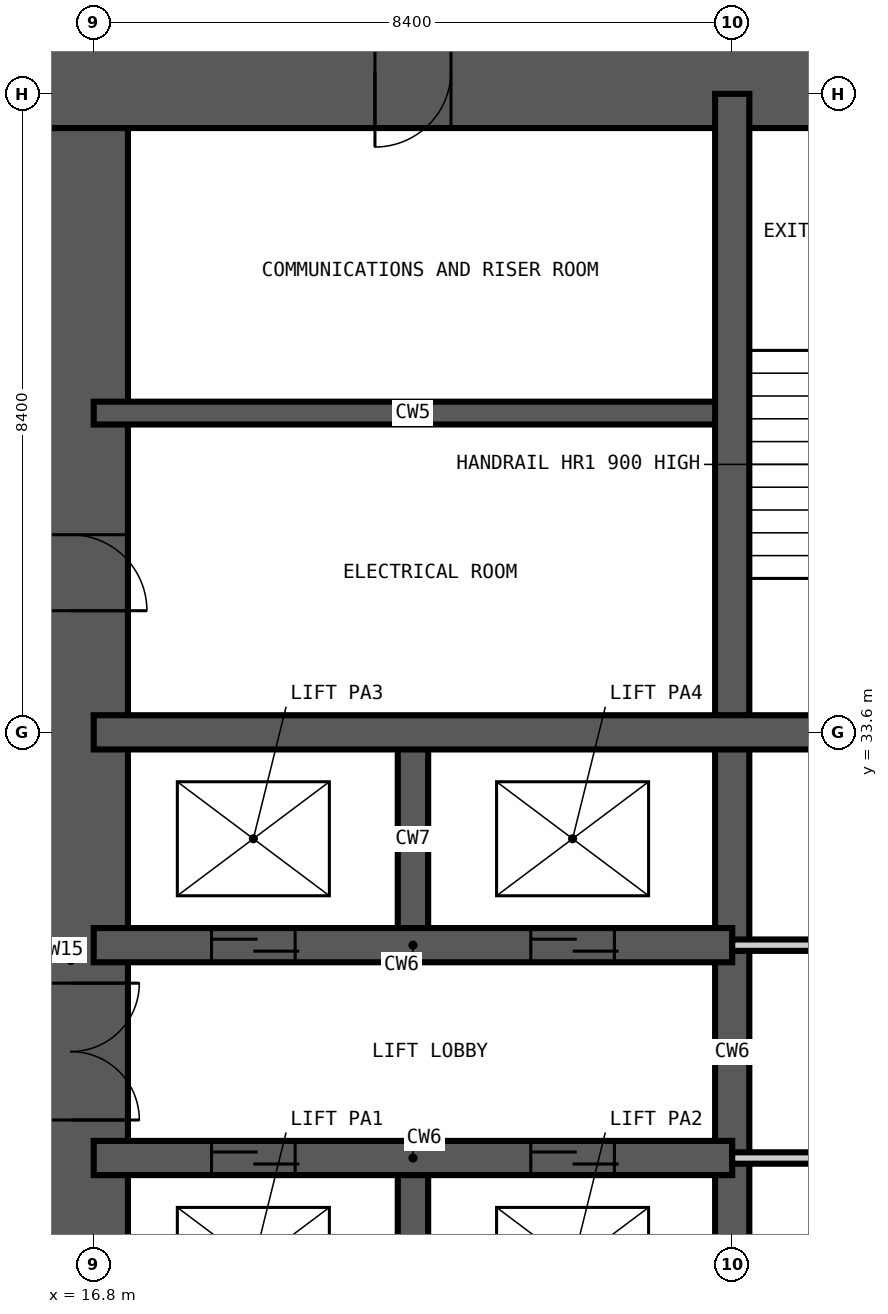
"""IFC4 building model, lengths in metres.
Left out: names, types, materials, properties, quantities, classifications, styles, units other than length and angle.
Written with IfcOpenShell. Run it as: python <this file> out.ifc"""

import sys

from ifc_helpers import new_model, si_unit, direction, frame, frame_2d, origin, place, context, subcontext, project, spatial, rectangle, extrude, element, fill, save


model = new_model("IFC4")
c1 = context("Model", 3, precision=1e-05, world=origin(), true_north=direction((0.0, 1.0)))
c2 = subcontext(c1, "Body", "Model", "MODEL_VIEW")
j1 = project(units=[si_unit("LENGTHUNIT", "METRE"), si_unit("PLANEANGLEUNIT", "RADIAN")], contexts=[c1])
p1 = place(None, origin())
s1 = spatial("IfcSite", under=j1, at=p1, CompositionType="ELEMENT")
p2 = place(p1, origin())
s2 = spatial("IfcBuilding", under=s1, at=p2, CompositionType="ELEMENT")
p3 = place(p2, frame((0.0, 0.0, 55.8)))
s3 = spatial("IfcBuildingStorey", under=s2, at=p3, CompositionType="ELEMENT", Elevation=55.8)
p4 = place(p3, frame((43.05, 42.3, -0.35), z_axis=(0.0, 0.0, 1.0), x_axis=(-1.0, 0.0, 0.0)))
e1 = element("IfcWall", 1, at=p4, inside=s3, PredefinedType="SHEAR", context=c2, shape_type="SweptSolid", body=[
    extrude(rectangle(XDim=27.3, YDim=1.5, at=frame_2d((13.65, 0.0))), origin(), (0.0, 0.0, 1.0), 3.6),
])
p5 = place(p4, frame((21.55, 0.0, 0.35)))
e2 = element("IfcOpeningElement", 2, at=p5, cuts=e1, PredefinedType="OPENING", context=c2, shape_type="SweptSolid", body=[
    extrude(rectangle(XDim=1.0, YDim=2.1, at=frame_2d((0.5, 1.05))), frame((0.0, 0.76, 0.0), z_axis=(0.0, -1.0, 0.0), x_axis=(1.0, 0.0, 0.0)), (0.0, 0.0, 1.0), 1.52),
])
p6 = place(p4, frame((10.95, 0.0, 0.35)))
e3 = element("IfcOpeningElement", 3, at=p6, cuts=e1, PredefinedType="OPENING", context=c2, shape_type="SweptSolid", body=[
    extrude(rectangle(XDim=1.2, YDim=2.2, at=frame_2d((0.6, 1.1))), frame((0.0, 0.76, 0.0), z_axis=(0.0, -1.0, 0.0), x_axis=(1.0, 0.0, 0.0)), (0.0, 0.0, 1.0), 1.52),
])
p7 = place(p3, frame((16.5, 41.55, -0.35), z_axis=(0.0, 0.0, 1.0), x_axis=(0.0, -1.0, 0.0)))
e4 = element("IfcWall", 4, at=p7, inside=s3, PredefinedType="SHEAR", context=c2, shape_type="SweptSolid", body=[
    extrude(rectangle(XDim=24.3, YDim=1.5, at=frame_2d((12.15, 0.0))), origin(), (0.0, 0.0, 1.0), 3.6),
])
p8 = place(p7, frame((11.25, 0.0, 0.35)))
e5 = element("IfcOpeningElement", 5, at=p8, cuts=e4, PredefinedType="OPENING", context=c2, shape_type="SweptSolid", body=[
    extrude(rectangle(XDim=1.8, YDim=2.2, at=frame_2d((0.9, 1.1))), frame((0.0, 0.76, 0.0), z_axis=(0.0, -1.0, 0.0), x_axis=(1.0, 0.0, 0.0)), (0.0, 0.0, 1.0), 1.52),
])
p9 = place(p7, frame((20.05, 0.0, 0.35)))
e6 = element("IfcOpeningElement", 6, at=p9, cuts=e4, PredefinedType="OPENING", context=c2, shape_type="SweptSolid", body=[
    extrude(rectangle(XDim=1.0, YDim=2.1, at=frame_2d((0.5, 1.05))), frame((0.0, 0.76, 0.0), z_axis=(0.0, -1.0, 0.0), x_axis=(1.0, 0.0, 0.0)), (0.0, 0.0, 1.0), 1.52),
])
p10 = place(p7, frame((5.35, 0.0, 0.35)))
e7 = element("IfcOpeningElement", 7, at=p10, cuts=e4, PredefinedType="OPENING", context=c2, shape_type="SweptSolid", body=[
    extrude(rectangle(XDim=1.0, YDim=2.1, at=frame_2d((0.5, 1.05))), frame((0.0, 0.76, 0.0), z_axis=(0.0, -1.0, 0.0), x_axis=(1.0, 0.0, 0.0)), (0.0, 0.0, 1.0), 1.52),
])
p11 = place(p3, frame((16.8, 37.8, -0.35), z_axis=(0.0, 0.0, 1.0), x_axis=(1.0, 0.0, 0.0)))
e8 = element("IfcWall", 8, at=p11, inside=s3, PredefinedType="SHEAR", context=c2, shape_type="SweptSolid", body=[
    extrude(rectangle(XDim=8.4, YDim=0.3, at=frame_2d((4.2, 0.0))), origin(), (0.0, 0.0, 1.0), 3.6),
])
for number, where, z_axis, x_axis in (
    (9, (21.0, 25.2, -0.35), (0.0, 0.0, 1.0), (0.0, 1.0, 0.0)),
    (10, (21.0, 30.8, -0.35), (0.0, 0.0, 1.0), (0.0, 1.0, 0.0)),
):
    element("IfcWall", number, at=place(p3, frame(where, z_axis=z_axis, x_axis=x_axis)), inside=s3, PredefinedType="SHEAR", context=c2, shape_type="SweptSolid", body=[
        extrude(rectangle(XDim=2.8, YDim=0.4, at=frame_2d((1.4, 0.0))), origin(), (0.0, 0.0, 1.0), 3.6),
    ])
p12 = place(p3, frame((25.2, 16.8, -0.35), z_axis=(0.0, 0.0, 1.0), x_axis=(0.0, 1.0, 0.0)))
e11 = element("IfcWall", 11, at=p12, inside=s3, PredefinedType="SHEAR", context=c2, shape_type="SweptSolid", body=[
    extrude(rectangle(XDim=25.2, YDim=0.45, at=frame_2d((12.6, 0.0))), origin(), (0.0, 0.0, 1.0), 3.6),
])
p13 = place(p3, frame((16.8, 28.0, -0.35), z_axis=(0.0, 0.0, 1.0), x_axis=(1.0, 0.0, 0.0)))
e12 = element("IfcWall", 12, at=p13, inside=s3, PredefinedType="SHEAR", context=c2, shape_type="SweptSolid", body=[
    extrude(rectangle(XDim=8.4, YDim=0.45, at=frame_2d((4.2, 0.0))), origin(), (0.0, 0.0, 1.0), 3.6),
])
p14 = place(p13, frame((1.55, 0.0, 0.35)))
e13 = element("IfcOpeningElement", 13, at=p14, cuts=e12, PredefinedType="OPENING", context=c2, shape_type="SweptSolid", body=[
    extrude(rectangle(XDim=1.1, YDim=2.2, at=frame_2d((0.55, 1.1))), frame((0.0, 0.235, 0.0), z_axis=(0.0, -1.0, 0.0), x_axis=(1.0, 0.0, 0.0)), (0.0, 0.0, 1.0), 0.47),
])
p15 = place(p13, frame((5.75, 0.0, 0.35)))
e14 = element("IfcOpeningElement", 14, at=p15, cuts=e12, PredefinedType="OPENING", context=c2, shape_type="SweptSolid", body=[
    extrude(rectangle(XDim=1.1, YDim=2.2, at=frame_2d((0.55, 1.1))), frame((0.0, 0.235, 0.0), z_axis=(0.0, -1.0, 0.0), x_axis=(1.0, 0.0, 0.0)), (0.0, 0.0, 1.0), 0.47),
])
p16 = place(p3, frame((16.8, 30.8, -0.35), z_axis=(0.0, 0.0, 1.0), x_axis=(1.0, 0.0, 0.0)))
e15 = element("IfcWall", 15, at=p16, inside=s3, PredefinedType="SHEAR", context=c2, shape_type="SweptSolid", body=[
    extrude(rectangle(XDim=8.4, YDim=0.45, at=frame_2d((4.2, 0.0))), origin(), (0.0, 0.0, 1.0), 3.6),
])
p17 = place(p16, frame((1.55, 0.0, 0.35)))
e16 = element("IfcOpeningElement", 16, at=p17, cuts=e15, PredefinedType="OPENING", context=c2, shape_type="SweptSolid", body=[
    extrude(rectangle(XDim=1.1, YDim=2.2, at=frame_2d((0.55, 1.1))), frame((0.0, 0.235, 0.0), z_axis=(0.0, -1.0, 0.0), x_axis=(1.0, 0.0, 0.0)), (0.0, 0.0, 1.0), 0.47),
])
p18 = place(p16, frame((5.75, 0.0, 0.35)))
e17 = element("IfcOpeningElement", 17, at=p18, cuts=e15, PredefinedType="OPENING", context=c2, shape_type="SweptSolid", body=[
    extrude(rectangle(XDim=1.1, YDim=2.2, at=frame_2d((0.55, 1.1))), frame((0.0, 0.235, 0.0), z_axis=(0.0, -1.0, 0.0), x_axis=(1.0, 0.0, 0.0)), (0.0, 0.0, 1.0), 0.47),
])
p19 = place(p3, frame((16.8, 33.6, -0.35), z_axis=(0.0, 0.0, 1.0), x_axis=(1.0, 0.0, 0.0)))
e18 = element("IfcWall", 18, at=p19, inside=s3, PredefinedType="SHEAR", context=c2, shape_type="SweptSolid", body=[
    extrude(rectangle(XDim=25.2, YDim=0.45, at=frame_2d((12.6, 0.0))), origin(), (0.0, 0.0, 1.0), 3.6),
])
p20 = place(p3, frame((25.2, 28.0, 0.0), z_axis=(0.0, 0.0, 1.0), x_axis=(1.0, 0.0, 0.0)))
e19 = element("IfcWall", 19, at=p20, inside=s3, PredefinedType="PARTITIONING", context=c2, shape_type="SweptSolid", body=[
    extrude(rectangle(XDim=8.4, YDim=0.15, at=frame_2d((4.2, 0.0))), origin(), (0.0, 0.0, 1.0), 3.25),
])
p21 = place(p20, frame((3.7, 0.0, 0.0)))
e20 = element("IfcOpeningElement", 20, at=p21, cuts=e19, PredefinedType="OPENING", context=c2, shape_type="SweptSolid", body=[
    extrude(rectangle(XDim=1.0, YDim=2.1, at=frame_2d((0.5, 1.05))), frame((0.0, 0.085, 0.0), z_axis=(0.0, -1.0, 0.0), x_axis=(1.0, 0.0, 0.0)), (0.0, 0.0, 1.0), 0.17),
])
p22 = place(p3, frame((25.2, 30.8, 0.0), z_axis=(0.0, 0.0, 1.0), x_axis=(1.0, 0.0, 0.0)))
e21 = element("IfcWall", 21, at=p22, inside=s3, PredefinedType="PARTITIONING", context=c2, shape_type="SweptSolid", body=[
    extrude(rectangle(XDim=8.4, YDim=0.15, at=frame_2d((4.2, 0.0))), origin(), (0.0, 0.0, 1.0), 3.25),
])
p23 = place(p22, frame((3.7, 0.0, 0.0)))
e22 = element("IfcOpeningElement", 22, at=p23, cuts=e21, PredefinedType="OPENING", context=c2, shape_type="SweptSolid", body=[
    extrude(rectangle(XDim=1.0, YDim=2.1, at=frame_2d((0.5, 1.05))), frame((0.0, 0.085, 0.0), z_axis=(0.0, -1.0, 0.0), x_axis=(1.0, 0.0, 0.0)), (0.0, 0.0, 1.0), 0.17),
])
p24 = place(p14, origin())
e23 = element("IfcDoor", 23, at=p24, inside=s3, OperationType="DOUBLE_DOOR_SLIDING", PredefinedType="DOOR", context=c2, shape_type="SweptSolid", body=[
    extrude(rectangle(XDim=1.1, YDim=2.2, at=frame_2d((0.55, 1.1))), frame((0.0, 0.025, 0.0), z_axis=(0.0, -1.0, 0.0), x_axis=(1.0, 0.0, 0.0)), (0.0, 0.0, 1.0), 0.05),
])
fill(e13, e23)
p25 = place(p15, origin())
e24 = element("IfcDoor", 24, at=p25, inside=s3, OperationType="DOUBLE_DOOR_SLIDING", PredefinedType="DOOR", context=c2, shape_type="SweptSolid", body=[
    extrude(rectangle(XDim=1.1, YDim=2.2, at=frame_2d((0.55, 1.1))), frame((0.0, 0.025, 0.0), z_axis=(0.0, -1.0, 0.0), x_axis=(1.0, 0.0, 0.0)), (0.0, 0.0, 1.0), 0.05),
])
fill(e14, e24)
p26 = place(p17, origin())
e25 = element("IfcDoor", 25, at=p26, inside=s3, OperationType="DOUBLE_DOOR_SLIDING", PredefinedType="DOOR", context=c2, shape_type="SweptSolid", body=[
    extrude(rectangle(XDim=1.1, YDim=2.2, at=frame_2d((0.55, 1.1))), frame((0.0, 0.025, 0.0), z_axis=(0.0, -1.0, 0.0), x_axis=(1.0, 0.0, 0.0)), (0.0, 0.0, 1.0), 0.05),
])
fill(e16, e25)
p27 = place(p18, origin())
e26 = element("IfcDoor", 26, at=p27, inside=s3, OperationType="DOUBLE_DOOR_SLIDING", PredefinedType="DOOR", context=c2, shape_type="SweptSolid", body=[
    extrude(rectangle(XDim=1.1, YDim=2.2, at=frame_2d((0.55, 1.1))), frame((0.0, 0.025, 0.0), z_axis=(0.0, -1.0, 0.0), x_axis=(1.0, 0.0, 0.0)), (0.0, 0.0, 1.0), 0.05),
])
fill(e17, e26)
p28 = place(p8, origin())
e27 = element("IfcDoor", 27, at=p28, inside=s3, OperationType="DOUBLE_DOOR_DOUBLE_SWING", PredefinedType="DOOR", context=c2, shape_type="SweptSolid", body=[
    extrude(rectangle(XDim=1.8, YDim=2.2, at=frame_2d((0.9, 1.1))), frame((0.0, 0.025, 0.0), z_axis=(0.0, -1.0, 0.0), x_axis=(1.0, 0.0, 0.0)), (0.0, 0.0, 1.0), 0.05),
])
fill(e5, e27)
p29 = place(p10, origin())
e28 = element("IfcDoor", 28, at=p29, inside=s3, OperationType="SINGLE_SWING_RIGHT", PredefinedType="DOOR", context=c2, shape_type="SweptSolid", body=[
    extrude(rectangle(XDim=1.0, YDim=2.1, at=frame_2d((0.5, 1.05))), frame((0.0, 0.025, 0.0), z_axis=(0.0, -1.0, 0.0), x_axis=(1.0, 0.0, 0.0)), (0.0, 0.0, 1.0), 0.05),
])
fill(e7, e28)
p30 = place(p5, origin())
e29 = element("IfcDoor", 29, at=p30, inside=s3, OperationType="SINGLE_SWING_RIGHT", PredefinedType="DOOR", context=c2, shape_type="SweptSolid", body=[
    extrude(rectangle(XDim=1.0, YDim=2.1, at=frame_2d((0.5, 1.05))), frame((0.0, 0.025, 0.0), z_axis=(0.0, -1.0, 0.0), x_axis=(1.0, 0.0, 0.0)), (0.0, 0.0, 1.0), 0.05),
])
fill(e2, e29)
save(model, sys.argv[1])
